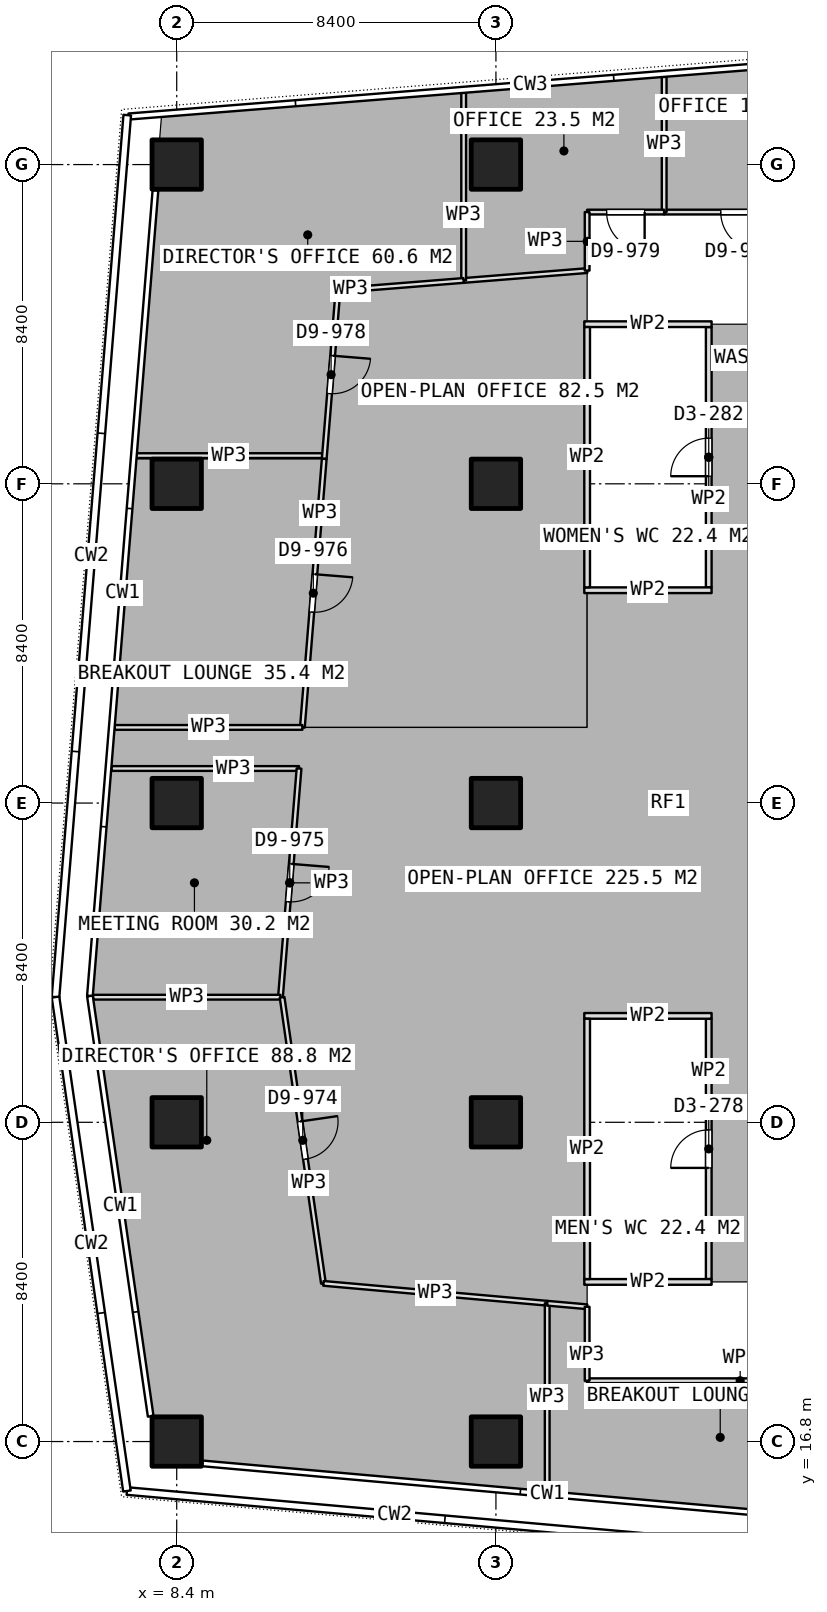
"""IFC4 building model, lengths in metres.
Left out: names, types, materials, properties, quantities, classifications, styles, units other than length and angle.
Written with IfcOpenShell. Run it as: python <this file> out.ifc"""

import sys

from ifc_helpers import new_model, si_unit, direction, frame, frame_2d, origin, origin_2d, place, context, subcontext, project, spatial, rectangle, extrude, element, fill, save


model = new_model("IFC4")
c1 = context("Model", 3, precision=1e-05, world=origin(), true_north=direction((0.0, 1.0)))
c2 = subcontext(c1, "Body", "Model", "MODEL_VIEW")
j1 = project(units=[si_unit("LENGTHUNIT", "METRE"), si_unit("PLANEANGLEUNIT", "RADIAN")], contexts=[c1])
p1 = place(None, origin())
s1 = spatial("IfcSite", under=j1, at=p1, CompositionType="ELEMENT")
p2 = place(p1, origin())
s2 = spatial("IfcBuilding", under=s1, at=p2, CompositionType="ELEMENT")
p3 = place(p2, frame((0.0, 0.0, 261.35)))
s3 = spatial("IfcBuildingStorey", under=s2, at=p3, CompositionType="ELEMENT", Elevation=261.35)
for number, where, z_axis, x_axis in (
    (1, (8.4, 16.8, 0.0), (0.0, 0.0, 1.0), (1.0, 0.0, 0.0)),
    (2, (8.4, 25.2, 0.0), (0.0, 0.0, 1.0), (1.0, 0.0, 0.0)),
    (3, (8.4, 33.6, 0.0), (0.0, 0.0, 1.0), (1.0, 0.0, 0.0)),
    (4, (8.4, 42.0, 0.0), (0.0, 0.0, 1.0), (1.0, 0.0, 0.0)),
    (5, (8.4, 50.4, 0.0), (0.0, 0.0, 1.0), (1.0, 0.0, 0.0)),
    (6, (16.8, 16.8, 0.0), (0.0, 0.0, 1.0), (1.0, 0.0, 0.0)),
    (7, (16.8, 25.2, 0.0), (0.0, 0.0, 1.0), (1.0, 0.0, 0.0)),
    (8, (16.8, 33.6, 0.0), (0.0, 0.0, 1.0), (1.0, 0.0, 0.0)),
    (9, (16.8, 42.0, 0.0), (0.0, 0.0, 1.0), (1.0, 0.0, 0.0)),
    (10, (16.8, 50.4, 0.0), (0.0, 0.0, 1.0), (1.0, 0.0, 0.0)),
):
    element("IfcColumn", number, at=place(p3, frame(where, z_axis=z_axis, x_axis=x_axis)), inside=s3, PredefinedType="COLUMN", context=c2, shape_type="SweptSolid", body=[
        extrude(rectangle(XDim=1.3, YDim=1.3, at=origin_2d()), origin(), (0.0, 0.0, 1.0), 3.75),
    ])
for number, where, z_axis, x_axis in (
    (11, (19.125, 39.2, 0.0), (0.0, 0.0, 1.0), (1.0, 0.0, 0.0)),
    (12, (19.125, 46.2, 0.0), (0.0, 0.0, 1.0), (1.0, 0.0, 0.0)),
):
    element("IfcWall", number, at=place(p3, frame(where, z_axis=z_axis, x_axis=x_axis)), inside=s3, PredefinedType="PARTITIONING", context=c2, shape_type="SweptSolid", body=[
        extrude(rectangle(XDim=3.35, YDim=0.15, at=frame_2d((1.675, 0.0))), origin(), (0.0, 0.0, 1.0), 3.5),
    ])
p4 = place(p3, frame((19.2, 39.275, 0.0), z_axis=(0.0, 0.0, 1.0), x_axis=(0.0, 1.0, 0.0)))
e13 = element("IfcWall", 13, at=p4, inside=s3, PredefinedType="PARTITIONING", context=c2, shape_type="SweptSolid", body=[
    extrude(rectangle(XDim=6.85, YDim=0.15, at=frame_2d((3.425, 0.0))), origin(), (0.0, 0.0, 1.0), 3.5),
])
p5 = place(p3, frame((22.4, 39.275, 0.0), z_axis=(0.0, 0.0, 1.0), x_axis=(0.0, 1.0, 0.0)))
e14 = element("IfcWall", 14, at=p5, inside=s3, PredefinedType="PARTITIONING", context=c2, shape_type="SweptSolid", body=[
    extrude(rectangle(XDim=6.85, YDim=0.15, at=frame_2d((3.425, 0.0))), origin(), (0.0, 0.0, 1.0), 3.5),
])
p6 = place(p5, frame((2.925, 0.0, 0.0)))
e15 = element("IfcOpeningElement", 15, at=p6, cuts=e14, PredefinedType="OPENING", context=c2, shape_type="SweptSolid", body=[
    extrude(rectangle(XDim=1.0, YDim=2.1, at=frame_2d((0.5, 1.05))), frame((0.0, 0.085, 0.0), z_axis=(0.0, -1.0, 0.0), x_axis=(1.0, 0.0, 0.0)), (0.0, 0.0, 1.0), 0.17),
])
for number, where, z_axis, x_axis in (
    (16, (19.125, 21.0, 0.0), (0.0, 0.0, 1.0), (1.0, 0.0, 0.0)),
    (17, (19.125, 28.0, 0.0), (0.0, 0.0, 1.0), (1.0, 0.0, 0.0)),
):
    element("IfcWall", number, at=place(p3, frame(where, z_axis=z_axis, x_axis=x_axis)), inside=s3, PredefinedType="PARTITIONING", context=c2, shape_type="SweptSolid", body=[
        extrude(rectangle(XDim=3.35, YDim=0.15, at=frame_2d((1.675, 0.0))), origin(), (0.0, 0.0, 1.0), 3.5),
    ])
p7 = place(p3, frame((19.2, 21.075, 0.0), z_axis=(0.0, 0.0, 1.0), x_axis=(0.0, 1.0, 0.0)))
e18 = element("IfcWall", 18, at=p7, inside=s3, PredefinedType="PARTITIONING", context=c2, shape_type="SweptSolid", body=[
    extrude(rectangle(XDim=6.85, YDim=0.15, at=frame_2d((3.425, 0.0))), origin(), (0.0, 0.0, 1.0), 3.5),
])
p8 = place(p3, frame((22.4, 21.075, 0.0), z_axis=(0.0, 0.0, 1.0), x_axis=(0.0, 1.0, 0.0)))
e19 = element("IfcWall", 19, at=p8, inside=s3, PredefinedType="PARTITIONING", context=c2, shape_type="SweptSolid", body=[
    extrude(rectangle(XDim=6.85, YDim=0.15, at=frame_2d((3.425, 0.0))), origin(), (0.0, 0.0, 1.0), 3.5),
])
p9 = place(p8, frame((2.925, 0.0, 0.0)))
e20 = element("IfcOpeningElement", 20, at=p9, cuts=e19, PredefinedType="OPENING", context=c2, shape_type="SweptSolid", body=[
    extrude(rectangle(XDim=1.0, YDim=2.1, at=frame_2d((0.5, 1.05))), frame((0.0, 0.085, 0.0), z_axis=(0.0, -1.0, 0.0), x_axis=(1.0, 0.0, 0.0)), (0.0, 0.0, 1.0), 0.17),
])
p10 = place(p3, frame((25.205, 49.15, 0.0), z_axis=(0.0, 0.0, 1.0), x_axis=(-1.0, 0.0, 0.0)))
e21 = element("IfcWall", 21, at=p10, inside=s3, PredefinedType="PARTITIONING", context=c2, shape_type="SweptSolid", body=[
    extrude(rectangle(XDim=3.978, YDim=0.125, at=frame_2d((1.989, 0.0))), origin(), (0.0, 0.0, 1.0), 3.5),
])
p11 = place(p10, frame((1.489, 0.0, 0.0)))
e22 = element("IfcOpeningElement", 22, at=p11, cuts=e21, PredefinedType="OPENING", context=c2, shape_type="SweptSolid", body=[
    extrude(rectangle(XDim=1.0, YDim=2.1, at=frame_2d((0.5, 1.05))), frame((0.0, 0.073, 0.0), z_axis=(0.0, -1.0, 0.0), x_axis=(1.0, 0.0, 0.0)), (0.0, 0.0, 1.0), 0.145),
])
p12 = place(p3, frame((21.227, 49.15, 0.0), z_axis=(0.0, 0.0, 1.0), x_axis=(0.0, 1.0, 0.0)))
e23 = element("IfcWall", 23, at=p12, inside=s3, PredefinedType="PARTITIONING", context=c2, shape_type="SweptSolid", body=[
    extrude(rectangle(XDim=3.558, YDim=0.125, at=frame_2d((1.779, 0.0))), origin(), (0.0, 0.0, 1.0), 3.5),
])
p13 = place(p3, frame((19.2, 47.61, 0.0), z_axis=(0.0, 0.0, 1.0), x_axis=(-0.99683691537, -0.079474298708, 0.0)))
e24 = element("IfcWall", 24, at=p13, inside=s3, PredefinedType="PARTITIONING", context=c2, shape_type="SweptSolid", body=[
    extrude(rectangle(XDim=3.259, YDim=0.125, at=frame_2d((1.63, 0.0))), origin(), (0.0, 0.0, 1.0), 3.5),
])
p14 = place(p3, frame((15.951, 47.351, 0.0), z_axis=(0.0, 0.0, 1.0), x_axis=(0.0, 1.0, 0.0)))
e25 = element("IfcWall", 25, at=p14, inside=s3, PredefinedType="PARTITIONING", context=c2, shape_type="SweptSolid", body=[
    extrude(rectangle(XDim=4.936, YDim=0.125, at=frame_2d((2.468, 0.0))), origin(), (0.0, 0.0, 1.0), 3.5),
])
p15 = place(p3, frame((21.226, 49.15, 0.0), z_axis=(0.0, 0.0, 1.0), x_axis=(-1.0, 0.0, 0.0)))
e26 = element("IfcWall", 26, at=p15, inside=s3, PredefinedType="PARTITIONING", context=c2, shape_type="SweptSolid", body=[
    extrude(rectangle(XDim=2.026, YDim=0.125, at=frame_2d((1.013, 0.0))), origin(), (0.0, 0.0, 1.0), 3.5),
])
p16 = place(p15, frame((0.513, 0.0, 0.0)))
e27 = element("IfcOpeningElement", 27, at=p16, cuts=e26, PredefinedType="OPENING", context=c2, shape_type="SweptSolid", body=[
    extrude(rectangle(XDim=1.0, YDim=2.1, at=frame_2d((0.5, 1.05))), frame((0.0, 0.073, 0.0), z_axis=(0.0, -1.0, 0.0), x_axis=(1.0, 0.0, 0.0)), (0.0, 0.0, 1.0), 0.145),
])
p17 = place(p3, frame((19.2, 49.15, 0.0), z_axis=(0.0, 0.0, 1.0), x_axis=(0.0, -1.0, 0.0)))
e28 = element("IfcWall", 28, at=p17, inside=s3, PredefinedType="PARTITIONING", context=c2, shape_type="SweptSolid", body=[
    extrude(rectangle(XDim=1.54, YDim=0.125, at=frame_2d((0.77, 0.0))), origin(), (0.0, 0.0, 1.0), 3.5),
])
p18 = place(p3, frame((12.226, 42.742, 0.0), z_axis=(0.0, 0.0, 1.0), x_axis=(-1.0, 0.0, 0.0)))
e29 = element("IfcWall", 29, at=p18, inside=s3, PredefinedType="PARTITIONING", context=c2, shape_type="SweptSolid", body=[
    extrude(rectangle(XDim=4.903, YDim=0.125, at=frame_2d((2.452, 0.0))), origin(), (0.0, 0.0, 1.0), 3.5),
])
p19 = place(p3, frame((15.95, 47.351, 0.0), z_axis=(0.0, 0.0, 1.0), x_axis=(-0.99682463174, -0.07962822086, 0.0)))
e30 = element("IfcWall", 30, at=p19, inside=s3, PredefinedType="PARTITIONING", context=c2, shape_type="SweptSolid", body=[
    extrude(rectangle(XDim=3.317, YDim=0.125, at=frame_2d((1.659, 0.0))), origin(), (0.0, 0.0, 1.0), 3.5),
])
p20 = place(p3, frame((12.643, 47.087, 0.0), z_axis=(0.0, 0.0, 1.0), x_axis=(-0.081240627764, -0.996694517092, 0.0)))
e31 = element("IfcWall", 31, at=p20, inside=s3, PredefinedType="PARTITIONING", context=c2, shape_type="SweptSolid", body=[
    extrude(rectangle(XDim=4.445, YDim=0.125, at=frame_2d((2.222, 0.0))), origin(), (0.0, 0.0, 1.0), 3.5),
])
p21 = place(p20, frame((1.722, 0.0, 0.0)))
e32 = element("IfcOpeningElement", 32, at=p21, cuts=e31, PredefinedType="OPENING", context=c2, shape_type="SweptSolid", body=[
    extrude(rectangle(XDim=1.0, YDim=2.1, at=frame_2d((0.5, 1.05))), frame((0.0, 0.073, 0.0), z_axis=(0.0, -1.0, 0.0), x_axis=(1.0, 0.0, 0.0)), (0.0, 0.0, 1.0), 0.145),
])
p22 = place(p3, frame((12.282, 42.656, 0.0), z_axis=(0.0, 0.0, 1.0), x_axis=(-0.08110159124, -0.996705840205, 0.0)))
e33 = element("IfcWall", 33, at=p22, inside=s3, PredefinedType="PARTITIONING", context=c2, shape_type="SweptSolid", body=[
    extrude(rectangle(XDim=7.089, YDim=0.125, at=frame_2d((3.545, 0.0))), origin(), (0.0, 0.0, 1.0), 3.5),
])
p23 = place(p22, frame((3.045, 0.0, 0.0)))
e34 = element("IfcOpeningElement", 34, at=p23, cuts=e33, PredefinedType="OPENING", context=c2, shape_type="SweptSolid", body=[
    extrude(rectangle(XDim=1.0, YDim=2.1, at=frame_2d((0.5, 1.05))), frame((0.0, 0.073, 0.0), z_axis=(0.0, -1.0, 0.0), x_axis=(1.0, 0.0, 0.0)), (0.0, 0.0, 1.0), 0.145),
])
p24 = place(p3, frame((11.707, 35.59, 0.0), z_axis=(0.0, 0.0, 1.0), x_axis=(-1.0, 0.0, 0.0)))
e35 = element("IfcWall", 35, at=p24, inside=s3, PredefinedType="PARTITIONING", context=c2, shape_type="SweptSolid", body=[
    extrude(rectangle(XDim=4.936, YDim=0.125, at=frame_2d((2.468, 0.0))), origin(), (0.0, 0.0, 1.0), 3.5),
])
p25 = place(p3, frame((6.683, 34.509, 0.0), z_axis=(0.0, 0.0, 1.0), x_axis=(1.0, 0.0, 0.0)))
e36 = element("IfcWall", 36, at=p25, inside=s3, PredefinedType="PARTITIONING", context=c2, shape_type="SweptSolid", body=[
    extrude(rectangle(XDim=4.936, YDim=0.125, at=frame_2d((2.468, 0.0))), origin(), (0.0, 0.0, 1.0), 3.5),
])
p26 = place(p3, frame((11.619, 34.509, 0.0), z_axis=(0.0, 0.0, 1.0), x_axis=(-0.081003722278, -0.99671379893, 0.0)))
e37 = element("IfcWall", 37, at=p26, inside=s3, PredefinedType="PARTITIONING", context=c2, shape_type="SweptSolid", body=[
    extrude(rectangle(XDim=6.037, YDim=0.125, at=frame_2d((3.019, 0.0))), origin(), (0.0, 0.0, 1.0), 3.5),
])
p27 = place(p26, frame((2.518, 0.0, 0.0)))
e38 = element("IfcOpeningElement", 38, at=p27, cuts=e37, PredefinedType="OPENING", context=c2, shape_type="SweptSolid", body=[
    extrude(rectangle(XDim=1.0, YDim=2.1, at=frame_2d((0.5, 1.05))), frame((0.0, 0.073, 0.0), z_axis=(0.0, -1.0, 0.0), x_axis=(1.0, 0.0, 0.0)), (0.0, 0.0, 1.0), 0.145),
])
p28 = place(p3, frame((11.13, 28.492, 0.0), z_axis=(0.0, 0.0, 1.0), x_axis=(-1.0, 0.0, 0.0)))
e39 = element("IfcWall", 39, at=p28, inside=s3, PredefinedType="PARTITIONING", context=c2, shape_type="SweptSolid", body=[
    extrude(rectangle(XDim=4.929, YDim=0.125, at=frame_2d((2.464, 0.0))), origin(), (0.0, 0.0, 1.0), 3.5),
])
p29 = place(p3, frame((11.173, 28.488, 0.0), z_axis=(0.0, 0.0, 1.0), x_axis=(0.143061748966, -0.989713764673, 0.0)))
e40 = element("IfcWall", 40, at=p29, inside=s3, PredefinedType="PARTITIONING", context=c2, shape_type="SweptSolid", body=[
    extrude(rectangle(XDim=7.604, YDim=0.125, at=frame_2d((3.802, 0.0))), origin(), (0.0, 0.0, 1.0), 3.5),
])
p30 = place(p29, frame((3.301, 0.0, 0.0)))
e41 = element("IfcOpeningElement", 41, at=p30, cuts=e40, PredefinedType="OPENING", context=c2, shape_type="SweptSolid", body=[
    extrude(rectangle(XDim=1.0, YDim=2.1, at=frame_2d((0.5, 1.05))), frame((0.0, 0.073, 0.0), z_axis=(0.0, -1.0, 0.0), x_axis=(1.0, 0.0, 0.0)), (0.0, 0.0, 1.0), 0.145),
])
p31 = place(p3, frame((12.261, 20.962, 0.0), z_axis=(0.0, 0.0, 1.0), x_axis=(0.996078951833, -0.08846876124, 0.0)))
e42 = element("IfcWall", 42, at=p31, inside=s3, PredefinedType="PARTITIONING", context=c2, shape_type="SweptSolid", body=[
    extrude(rectangle(XDim=5.911, YDim=0.125, at=frame_2d((2.956, 0.0))), origin(), (0.0, 0.0, 1.0), 3.5),
])
p32 = place(p3, frame((18.149, 20.439, 0.0), z_axis=(0.0, 0.0, 1.0), x_axis=(0.0, -1.0, 0.0)))
e43 = element("IfcWall", 43, at=p32, inside=s3, PredefinedType="PARTITIONING", context=c2, shape_type="SweptSolid", body=[
    extrude(rectangle(XDim=4.939, YDim=0.125, at=frame_2d((2.469, 0.0))), origin(), (0.0, 0.0, 1.0), 3.5),
])
p33 = place(p3, frame((19.2, 18.4, 0.0), z_axis=(0.0, 0.0, 1.0), x_axis=(1.0, 0.0, 0.0)))
e44 = element("IfcWall", 44, at=p33, inside=s3, PredefinedType="PARTITIONING", context=c2, shape_type="SweptSolid", body=[
    extrude(rectangle(XDim=8.054, YDim=0.125, at=frame_2d((4.027, 0.0))), origin(), (0.0, 0.0, 1.0), 3.5),
])
p34 = place(p3, frame((18.15, 20.439, 0.0), z_axis=(0.0, 0.0, 1.0), x_axis=(0.996099374617, -0.088238517026, 0.0)))
e45 = element("IfcWall", 45, at=p34, inside=s3, PredefinedType="PARTITIONING", context=c2, shape_type="SweptSolid", body=[
    extrude(rectangle(XDim=1.054, YDim=0.125, at=frame_2d((0.527, 0.0))), origin(), (0.0, 0.0, 1.0), 3.5),
])
p35 = place(p3, frame((19.2, 20.346, 0.0), z_axis=(0.0, 0.0, 1.0), x_axis=(0.0, -1.0, 0.0)))
e46 = element("IfcWall", 46, at=p35, inside=s3, PredefinedType="PARTITIONING", context=c2, shape_type="SweptSolid", body=[
    extrude(rectangle(XDim=1.946, YDim=0.125, at=frame_2d((0.973, 0.0))), origin(), (0.0, 0.0, 1.0), 3.5),
])
p36 = place(p6, origin())
e47 = element("IfcDoor", 47, at=p36, inside=s3, OperationType="SINGLE_SWING_LEFT", PredefinedType="DOOR", context=c2, shape_type="SweptSolid", body=[
    extrude(rectangle(XDim=1.0, YDim=2.1, at=frame_2d((0.5, 1.05))), frame((0.0, 0.025, 0.0), z_axis=(0.0, -1.0, 0.0), x_axis=(1.0, 0.0, 0.0)), (0.0, 0.0, 1.0), 0.05),
])
fill(e15, e47)
p37 = place(p9, origin())
e48 = element("IfcDoor", 48, at=p37, inside=s3, OperationType="SINGLE_SWING_LEFT", PredefinedType="DOOR", context=c2, shape_type="SweptSolid", body=[
    extrude(rectangle(XDim=1.0, YDim=2.1, at=frame_2d((0.5, 1.05))), frame((0.0, 0.025, 0.0), z_axis=(0.0, -1.0, 0.0), x_axis=(1.0, 0.0, 0.0)), (0.0, 0.0, 1.0), 0.05),
])
fill(e20, e48)
p38 = place(p11, origin())
e49 = element("IfcDoor", 49, at=p38, inside=s3, OperationType="SINGLE_SWING_LEFT", PredefinedType="DOOR", context=c2, shape_type="SweptSolid", body=[
    extrude(rectangle(XDim=1.0, YDim=2.1, at=frame_2d((0.5, 1.05))), frame((0.0, 0.025, 0.0), z_axis=(0.0, -1.0, 0.0), x_axis=(1.0, 0.0, 0.0)), (0.0, 0.0, 1.0), 0.05),
])
fill(e22, e49)
p39 = place(p16, origin())
e50 = element("IfcDoor", 50, at=p39, inside=s3, OperationType="SINGLE_SWING_LEFT", PredefinedType="DOOR", context=c2, shape_type="SweptSolid", body=[
    extrude(rectangle(XDim=1.0, YDim=2.1, at=frame_2d((0.5, 1.05))), frame((0.0, 0.025, 0.0), z_axis=(0.0, -1.0, 0.0), x_axis=(1.0, 0.0, 0.0)), (0.0, 0.0, 1.0), 0.05),
])
fill(e27, e50)
p40 = place(p21, origin())
e51 = element("IfcDoor", 51, at=p40, inside=s3, OperationType="SINGLE_SWING_LEFT", PredefinedType="DOOR", context=c2, shape_type="SweptSolid", body=[
    extrude(rectangle(XDim=1.0, YDim=2.1, at=frame_2d((0.5, 1.05))), frame((0.0, 0.025, 0.0), z_axis=(0.0, -1.0, 0.0), x_axis=(1.0, 0.0, 0.0)), (0.0, 0.0, 1.0), 0.05),
])
fill(e32, e51)
p41 = place(p23, origin())
e52 = element("IfcDoor", 52, at=p41, inside=s3, OperationType="SINGLE_SWING_LEFT", PredefinedType="DOOR", context=c2, shape_type="SweptSolid", body=[
    extrude(rectangle(XDim=1.0, YDim=2.1, at=frame_2d((0.5, 1.05))), frame((0.0, 0.025, 0.0), z_axis=(0.0, -1.0, 0.0), x_axis=(1.0, 0.0, 0.0)), (0.0, 0.0, 1.0), 0.05),
])
fill(e34, e52)
p42 = place(p27, origin())
e53 = element("IfcDoor", 53, at=p42, inside=s3, OperationType="SINGLE_SWING_LEFT", PredefinedType="DOOR", context=c2, shape_type="SweptSolid", body=[
    extrude(rectangle(XDim=1.0, YDim=2.1, at=frame_2d((0.5, 1.05))), frame((0.0, 0.025, 0.0), z_axis=(0.0, -1.0, 0.0), x_axis=(1.0, 0.0, 0.0)), (0.0, 0.0, 1.0), 0.05),
])
fill(e38, e53)
p43 = place(p30, origin())
e54 = element("IfcDoor", 54, at=p43, inside=s3, OperationType="SINGLE_SWING_LEFT", PredefinedType="DOOR", context=c2, shape_type="SweptSolid", body=[
    extrude(rectangle(XDim=1.0, YDim=2.1, at=frame_2d((0.5, 1.05))), frame((0.0, 0.025, 0.0), z_axis=(0.0, -1.0, 0.0), x_axis=(1.0, 0.0, 0.0)), (0.0, 0.0, 1.0), 0.05),
])
fill(e41, e54)
save(model, sys.argv[1])
